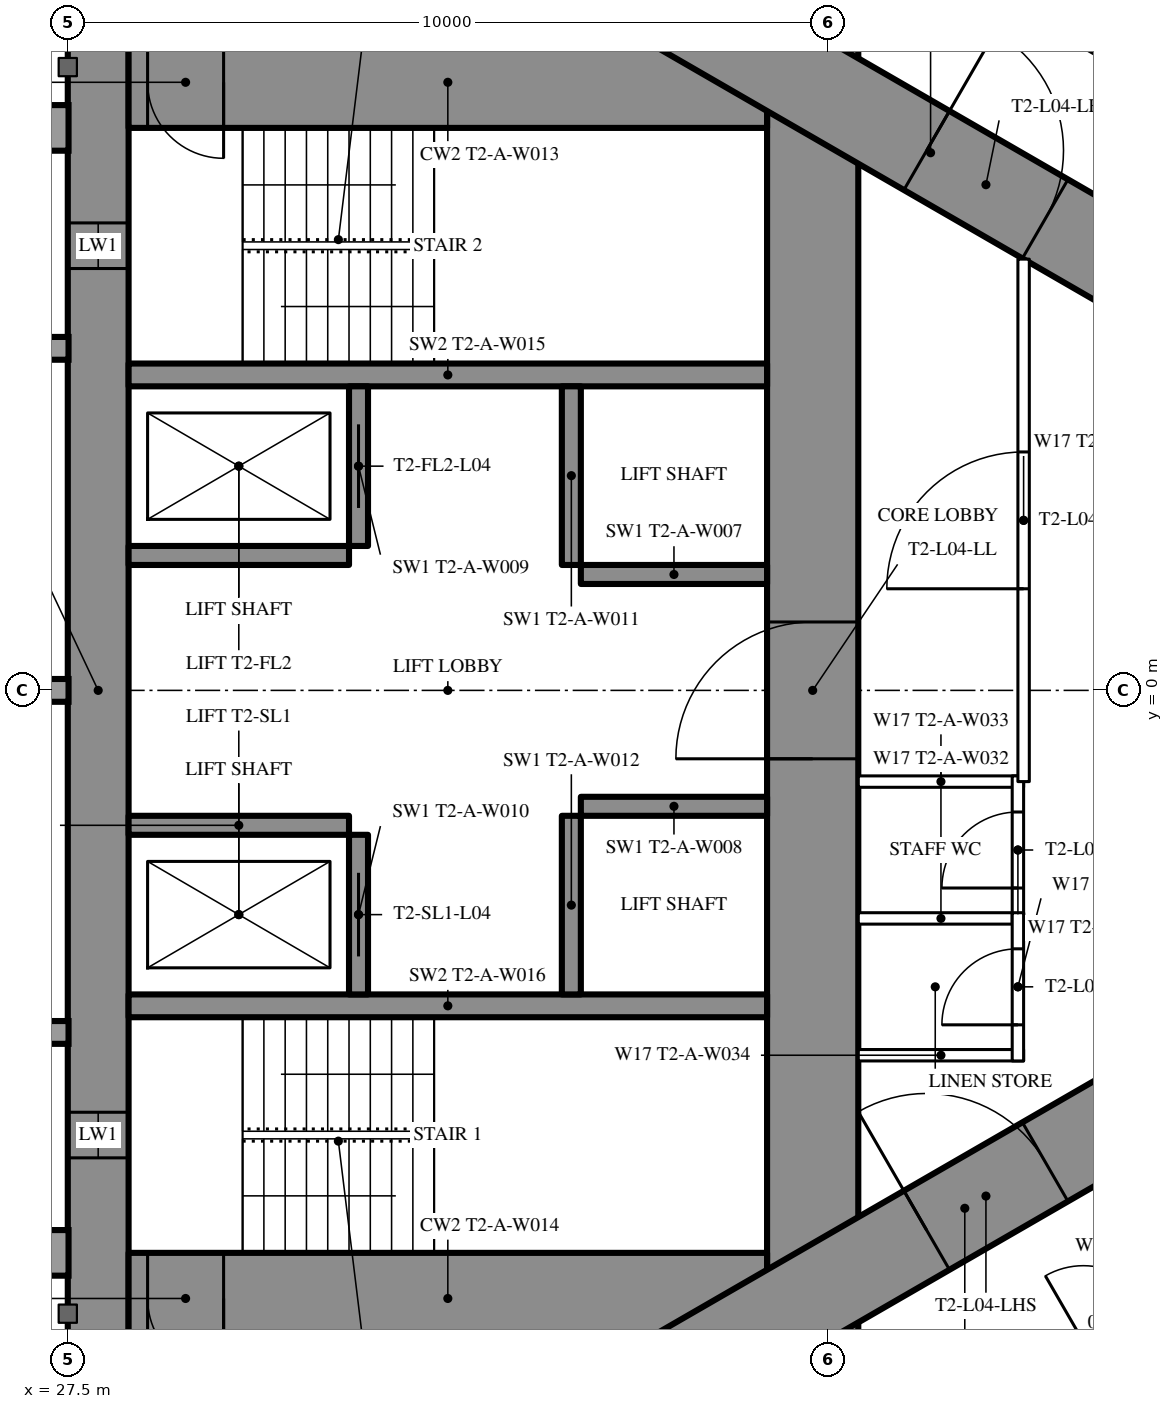
"""IFC4 building model, lengths in metres.
Left out: names, types, materials, properties, quantities, classifications, styles, units other than length and angle.
Written with IfcOpenShell. Run it as: python <this file> out.ifc"""

import sys

from ifc_helpers import new_model, si_unit, direction, frame, frame_2d, origin, place, context, subcontext, project, spatial, rectangle, extrude, element, fill, save


model = new_model("IFC4")
c1 = context("Model", 3, precision=1e-05, world=origin(), true_north=direction((0.0, 1.0)))
c2 = subcontext(c1, "Body", "Model", "MODEL_VIEW")
j1 = project(units=[si_unit("LENGTHUNIT", "METRE"), si_unit("PLANEANGLEUNIT", "RADIAN")], contexts=[c1])
p1 = place(None, origin())
s1 = spatial("IfcSite", under=j1, at=p1, CompositionType="ELEMENT")
p2 = place(p1, origin())
s2 = spatial("IfcBuilding", under=s1, at=p2, CompositionType="ELEMENT")
p3 = place(p2, frame((0.0, 0.0, 21.5)))
s3 = spatial("IfcBuildingStorey", under=s2, at=p3, CompositionType="ELEMENT", Elevation=21.5)
p4 = place(p3, frame((27.9, -8.6, 0.0), z_axis=(0.0, 0.0, 1.0), x_axis=(0.0, 1.0, 0.0)))
e1 = element("IfcWall", 1, at=p4, inside=s3, PredefinedType="SHEAR", context=c2, shape_type="SweptSolid", body=[
    extrude(rectangle(XDim=17.2, YDim=0.8, at=frame_2d((8.6, 0.0))), origin(), (0.0, 0.0, 1.0), 3.5),
])
p5 = place(p4, frame((2.45, 0.0, 0.6)))
e2 = element("IfcOpeningElement", 2, at=p5, cuts=e1, PredefinedType="OPENING", context=c2, shape_type="SweptSolid", body=[
    extrude(rectangle(XDim=0.6, YDim=2.1, at=frame_2d((0.3, 1.05))), frame((0.0, 0.41, 0.0), z_axis=(0.0, -1.0, 0.0), x_axis=(1.0, 0.0, 0.0)), (0.0, 0.0, 1.0), 0.82),
])
p6 = place(p4, frame((14.15, 0.0, 0.6)))
e3 = element("IfcOpeningElement", 3, at=p6, cuts=e1, PredefinedType="OPENING", context=c2, shape_type="SweptSolid", body=[
    extrude(rectangle(XDim=0.6, YDim=2.1, at=frame_2d((0.3, 1.05))), frame((0.0, 0.41, 0.0), z_axis=(0.0, -1.0, 0.0), x_axis=(1.0, 0.0, 0.0)), (0.0, 0.0, 1.0), 0.82),
])
p7 = place(p3, frame((37.3, -8.6, 0.0), z_axis=(0.0, 0.0, 1.0), x_axis=(0.0, 1.0, 0.0)))
e4 = element("IfcWall", 4, at=p7, inside=s3, PredefinedType="SHEAR", context=c2, shape_type="SweptSolid", body=[
    extrude(rectangle(XDim=17.2, YDim=1.2, at=frame_2d((8.6, 0.0))), origin(), (0.0, 0.0, 1.0), 3.5),
])
p8 = place(p7, frame((7.7, 0.0, 0.0)))
e5 = element("IfcOpeningElement", 5, at=p8, cuts=e4, PredefinedType="OPENING", context=c2, shape_type="SweptSolid", body=[
    extrude(rectangle(XDim=1.8, YDim=2.2, at=frame_2d((0.9, 1.1))), frame((0.0, 0.61, 0.0), z_axis=(0.0, -1.0, 0.0), x_axis=(1.0, 0.0, 0.0)), (0.0, 0.0, 1.0), 1.22),
])
p9 = place(p3, frame((28.3, -8.0, 0.0), z_axis=(0.0, 0.0, 1.0), x_axis=(1.0, 0.0, 0.0)))
e6 = element("IfcWall", 6, at=p9, inside=s3, PredefinedType="SHEAR", context=c2, shape_type="SweptSolid", body=[
    extrude(rectangle(XDim=8.4, YDim=1.2, at=frame_2d((4.2, 0.0))), origin(), (0.0, 0.0, 1.0), 3.5),
])
p10 = place(p9, frame((0.25, 0.0, 0.0)))
e7 = element("IfcOpeningElement", 7, at=p10, cuts=e6, PredefinedType="OPENING", context=c2, shape_type="SweptSolid", body=[
    extrude(rectangle(XDim=1.0, YDim=2.2, at=frame_2d((0.5, 1.1))), frame((0.0, 0.61, 0.0), z_axis=(0.0, -1.0, 0.0), x_axis=(1.0, 0.0, 0.0)), (0.0, 0.0, 1.0), 1.22),
])
p11 = place(p3, frame((28.3, 8.0, 0.0), z_axis=(0.0, 0.0, 1.0), x_axis=(1.0, 0.0, 0.0)))
e8 = element("IfcWall", 8, at=p11, inside=s3, PredefinedType="SHEAR", context=c2, shape_type="SweptSolid", body=[
    extrude(rectangle(XDim=8.4, YDim=1.2, at=frame_2d((4.2, 0.0))), origin(), (0.0, 0.0, 1.0), 3.5),
])
p12 = place(p11, frame((0.25, 0.0, 0.0)))
e9 = element("IfcOpeningElement", 9, at=p12, cuts=e8, PredefinedType="OPENING", context=c2, shape_type="SweptSolid", body=[
    extrude(rectangle(XDim=1.0, YDim=2.2, at=frame_2d((0.5, 1.1))), frame((0.0, 0.61, 0.0), z_axis=(0.0, -1.0, 0.0), x_axis=(1.0, 0.0, 0.0)), (0.0, 0.0, 1.0), 1.22),
])
for number, where, z_axis, x_axis in (
    (10, (28.3, -4.15, 0.0), (0.0, 0.0, 1.0), (1.0, 0.0, 0.0)),
    (11, (28.3, 4.15, 0.0), (0.0, 0.0, 1.0), (1.0, 0.0, 0.0)),
):
    element("IfcWall", number, at=place(p3, frame(where, z_axis=z_axis, x_axis=x_axis)), inside=s3, PredefinedType="SHEAR", context=c2, shape_type="SweptSolid", body=[
        extrude(rectangle(XDim=8.4, YDim=0.3, at=frame_2d((4.2, 0.0))), origin(), (0.0, 0.0, 1.0), 3.5),
    ])
p13 = place(p3, frame((31.325, -4.0, 0.0), z_axis=(0.0, 0.0, 1.0), x_axis=(0.0, 1.0, 0.0)))
e12 = element("IfcWall", 12, at=p13, inside=s3, PredefinedType="SHEAR", context=c2, shape_type="SweptSolid", body=[
    extrude(rectangle(XDim=2.1, YDim=0.25, at=frame_2d((1.05, 0.0))), origin(), (0.0, 0.0, 1.0), 3.5),
])
p14 = place(p13, frame((0.5, 0.0, 0.0)))
e13 = element("IfcOpeningElement", 13, at=p14, cuts=e12, PredefinedType="OPENING", context=c2, shape_type="SweptSolid", body=[
    extrude(rectangle(XDim=1.1, YDim=2.2, at=frame_2d((0.55, 1.1))), frame((0.0, 0.135, 0.0), z_axis=(0.0, -1.0, 0.0), x_axis=(1.0, 0.0, 0.0)), (0.0, 0.0, 1.0), 0.27),
])
p15 = place(p3, frame((34.125, -4.0, 0.0), z_axis=(0.0, 0.0, 1.0), x_axis=(0.0, 1.0, 0.0)))
e14 = element("IfcWall", 14, at=p15, inside=s3, PredefinedType="SHEAR", context=c2, shape_type="SweptSolid", body=[
    extrude(rectangle(XDim=2.35, YDim=0.25, at=frame_2d((1.175, 0.0))), origin(), (0.0, 0.0, 1.0), 3.5),
])
p16 = place(p3, frame((28.3, -1.775, 0.0), z_axis=(0.0, 0.0, 1.0), x_axis=(1.0, 0.0, 0.0)))
e15 = element("IfcWall", 15, at=p16, inside=s3, PredefinedType="SHEAR", context=c2, shape_type="SweptSolid", body=[
    extrude(rectangle(XDim=2.9, YDim=0.25, at=frame_2d((1.45, 0.0))), origin(), (0.0, 0.0, 1.0), 3.5),
])
p17 = place(p3, frame((34.25, -1.525, 0.0), z_axis=(0.0, 0.0, 1.0), x_axis=(1.0, 0.0, 0.0)))
e16 = element("IfcWall", 16, at=p17, inside=s3, PredefinedType="SHEAR", context=c2, shape_type="SweptSolid", body=[
    extrude(rectangle(XDim=2.45, YDim=0.25, at=frame_2d((1.225, 0.0))), origin(), (0.0, 0.0, 1.0), 3.5),
])
p18 = place(p3, frame((31.325, 1.9, 0.0), z_axis=(0.0, 0.0, 1.0), x_axis=(0.0, 1.0, 0.0)))
e17 = element("IfcWall", 17, at=p18, inside=s3, PredefinedType="SHEAR", context=c2, shape_type="SweptSolid", body=[
    extrude(rectangle(XDim=2.1, YDim=0.25, at=frame_2d((1.05, 0.0))), origin(), (0.0, 0.0, 1.0), 3.5),
])
p19 = place(p18, frame((0.5, 0.0, 0.0)))
e18 = element("IfcOpeningElement", 18, at=p19, cuts=e17, PredefinedType="OPENING", context=c2, shape_type="SweptSolid", body=[
    extrude(rectangle(XDim=1.1, YDim=2.2, at=frame_2d((0.55, 1.1))), frame((0.0, 0.135, 0.0), z_axis=(0.0, -1.0, 0.0), x_axis=(1.0, 0.0, 0.0)), (0.0, 0.0, 1.0), 0.27),
])
p20 = place(p3, frame((34.125, 1.65, 0.0), z_axis=(0.0, 0.0, 1.0), x_axis=(0.0, 1.0, 0.0)))
e19 = element("IfcWall", 19, at=p20, inside=s3, PredefinedType="SHEAR", context=c2, shape_type="SweptSolid", body=[
    extrude(rectangle(XDim=2.35, YDim=0.25, at=frame_2d((1.175, 0.0))), origin(), (0.0, 0.0, 1.0), 3.5),
])
p21 = place(p3, frame((28.3, 1.775, 0.0), z_axis=(0.0, 0.0, 1.0), x_axis=(1.0, 0.0, 0.0)))
e20 = element("IfcWall", 20, at=p21, inside=s3, PredefinedType="SHEAR", context=c2, shape_type="SweptSolid", body=[
    extrude(rectangle(XDim=2.9, YDim=0.25, at=frame_2d((1.45, 0.0))), origin(), (0.0, 0.0, 1.0), 3.5),
])
p22 = place(p3, frame((34.25, 1.525, 0.0), z_axis=(0.0, 0.0, 1.0), x_axis=(1.0, 0.0, 0.0)))
e21 = element("IfcWall", 21, at=p22, inside=s3, PredefinedType="SHEAR", context=c2, shape_type="SweptSolid", body=[
    extrude(rectangle(XDim=2.45, YDim=0.25, at=frame_2d((1.225, 0.0))), origin(), (0.0, 0.0, 1.0), 3.5),
])
p23 = place(p3, frame((27.2, -13.8, 0.0), z_axis=(0.0, 0.0, 1.0), x_axis=(0.866027159892, 0.499996958321, 0.0)))
e22 = element("IfcWall", 22, at=p23, inside=s3, PredefinedType="SHEAR", context=c2, shape_type="SweptSolid", body=[
    extrude(rectangle(XDim=27.947, YDim=1.2, at=frame_2d((13.973, 0.0))), origin(), (0.0, 0.0, 1.0), 3.5),
])
p24 = place(p23, frame((4.6, 0.0, 0.0)))
e23 = element("IfcOpeningElement", 23, at=p24, cuts=e22, PredefinedType="OPENING", context=c2, shape_type="SweptSolid", body=[
    extrude(rectangle(XDim=1.0, YDim=2.2, at=frame_2d((0.5, 1.1))), frame((0.0, 0.61, 0.0), z_axis=(0.0, -1.0, 0.0), x_axis=(1.0, 0.0, 0.0)), (0.0, 0.0, 1.0), 1.22),
])
p25 = place(p23, frame((13.395, 0.0, 0.0)))
e24 = element("IfcOpeningElement", 24, at=p25, cuts=e22, PredefinedType="OPENING", context=c2, shape_type="SweptSolid", body=[
    extrude(rectangle(XDim=1.8, YDim=2.2, at=frame_2d((0.9, 1.1))), frame((0.0, 0.61, 0.0), z_axis=(0.0, -1.0, 0.0), x_axis=(1.0, 0.0, 0.0)), (0.0, 0.0, 1.0), 1.22),
])
p26 = place(p3, frame((27.2, 13.8, 0.0), z_axis=(0.0, 0.0, 1.0), x_axis=(0.866024515034, -0.500001539357, 0.0)))
e25 = element("IfcWall", 25, at=p26, inside=s3, PredefinedType="SHEAR", context=c2, shape_type="SweptSolid", body=[
    extrude(rectangle(XDim=26.907, YDim=1.2, at=frame_2d((13.454, 0.0))), origin(), (0.0, 0.0, 1.0), 3.5),
])
p27 = place(p26, frame((4.6, 0.0, 0.0)))
e26 = element("IfcOpeningElement", 26, at=p27, cuts=e25, PredefinedType="OPENING", context=c2, shape_type="SweptSolid", body=[
    extrude(rectangle(XDim=1.0, YDim=2.2, at=frame_2d((0.5, 1.1))), frame((0.0, 0.61, 0.0), z_axis=(0.0, -1.0, 0.0), x_axis=(1.0, 0.0, 0.0)), (0.0, 0.0, 1.0), 1.22),
])
p28 = place(p26, frame((13.395, 0.0, 0.0)))
e27 = element("IfcOpeningElement", 27, at=p28, cuts=e25, PredefinedType="OPENING", context=c2, shape_type="SweptSolid", body=[
    extrude(rectangle(XDim=1.8, YDim=2.2, at=frame_2d((0.9, 1.1))), frame((0.0, 0.61, 0.0), z_axis=(0.0, -1.0, 0.0), x_axis=(1.0, 0.0, 0.0)), (0.0, 0.0, 1.0), 1.22),
])
p29 = place(p3, frame((36.834, 10.894, 0.0), z_axis=(0.0, 0.0, 1.0), x_axis=(0.866028157229, -0.499995230863, 0.0)))
e28 = element("IfcWall", 28, at=p29, inside=s3, PredefinedType="PARTITIONING", context=c2, shape_type="SweptSolid", body=[
    extrude(rectangle(XDim=21.667, YDim=0.2, at=frame_2d((10.833, 0.0))), origin(), (0.0, 0.0, 1.0), 3.25),
])
p30 = place(p29, frame((18.885, 0.0, 0.0)))
e29 = element("IfcOpeningElement", 29, at=p30, cuts=e28, PredefinedType="OPENING", context=c2, shape_type="SweptSolid", body=[
    extrude(rectangle(XDim=0.95, YDim=2.2, at=frame_2d((0.475, 1.1))), frame((0.0, 0.11, 0.0), z_axis=(0.0, -1.0, 0.0), x_axis=(1.0, 0.0, 0.0)), (0.0, 0.0, 1.0), 0.22),
])
p31 = place(p29, frame((14.835, 0.0, 0.0)))
e30 = element("IfcOpeningElement", 30, at=p31, cuts=e28, PredefinedType="OPENING", context=c2, shape_type="SweptSolid", body=[
    extrude(rectangle(XDim=0.95, YDim=2.2, at=frame_2d((0.475, 1.1))), frame((0.0, 0.11, 0.0), z_axis=(0.0, -1.0, 0.0), x_axis=(1.0, 0.0, 0.0)), (0.0, 0.0, 1.0), 0.22),
])
p32 = place(p29, frame((12.85, 0.0, 0.0)))
e31 = element("IfcOpeningElement", 31, at=p32, cuts=e28, PredefinedType="OPENING", context=c2, shape_type="SweptSolid", body=[
    extrude(rectangle(XDim=0.95, YDim=2.2, at=frame_2d((0.475, 1.1))), frame((0.0, 0.11, 0.0), z_axis=(0.0, -1.0, 0.0), x_axis=(1.0, 0.0, 0.0)), (0.0, 0.0, 1.0), 0.22),
])
p33 = place(p29, frame((1.542, 0.0, 0.0)))
e32 = element("IfcOpeningElement", 32, at=p33, cuts=e28, PredefinedType="OPENING", context=c2, shape_type="SweptSolid", body=[
    extrude(rectangle(XDim=0.95, YDim=2.2, at=frame_2d((0.475, 1.1))), frame((0.0, 0.11, 0.0), z_axis=(0.0, -1.0, 0.0), x_axis=(1.0, 0.0, 0.0)), (0.0, 0.0, 1.0), 0.22),
])
p34 = place(p3, frame((37.96, -10.243, 0.0), z_axis=(0.0, 0.0, 1.0), x_axis=(0.866024617314, 0.500001362204, 0.0)))
e33 = element("IfcWall", 33, at=p34, inside=s3, PredefinedType="PARTITIONING", context=c2, shape_type="SweptSolid", body=[
    extrude(rectangle(XDim=8.512, YDim=0.2, at=frame_2d((4.256, 0.0))), origin(), (0.0, 0.0, 1.0), 3.25),
])
p35 = place(p34, frame((3.35, 0.0, 0.0)))
e34 = element("IfcOpeningElement", 34, at=p35, cuts=e33, PredefinedType="OPENING", context=c2, shape_type="SweptSolid", body=[
    extrude(rectangle(XDim=1.0, YDim=2.2, at=frame_2d((0.5, 1.1))), frame((0.0, 0.11, 0.0), z_axis=(0.0, -1.0, 0.0), x_axis=(1.0, 0.0, 0.0)), (0.0, 0.0, 1.0), 0.22),
])
for number, where, z_axis, x_axis in (
    (35, (37.9, -1.2, 0.0), (0.0, 0.0, 1.0), (1.0, 0.0, 0.0)),
    (36, (37.9, -3.0, 0.0), (0.0, 0.0, 1.0), (1.0, 0.0, 0.0)),
    (37, (37.9, -4.8, 0.0), (0.0, 0.0, 1.0), (1.0, 0.0, 0.0)),
):
    element("IfcWall", number, at=place(p3, frame(where, z_axis=z_axis, x_axis=x_axis)), inside=s3, PredefinedType="PARTITIONING", context=c2, shape_type="SweptSolid", body=[
        extrude(rectangle(XDim=2.175, YDim=0.15, at=frame_2d((1.087, 0.0))), origin(), (0.0, 0.0, 1.0), 3.25),
    ])
p36 = place(p3, frame((40.0, -3.075, 0.0), z_axis=(0.0, 0.0, 1.0), x_axis=(0.0, 1.0, 0.0)))
e38 = element("IfcWall", 38, at=p36, inside=s3, PredefinedType="PARTITIONING", context=c2, shape_type="SweptSolid", body=[
    extrude(rectangle(XDim=1.95, YDim=0.15, at=frame_2d((0.975, 0.0))), origin(), (0.0, 0.0, 1.0), 3.25),
])
p37 = place(p36, frame((0.475, 0.0, 0.0)))
e39 = element("IfcOpeningElement", 39, at=p37, cuts=e38, PredefinedType="OPENING", context=c2, shape_type="SweptSolid", body=[
    extrude(rectangle(XDim=1.0, YDim=2.2, at=frame_2d((0.5, 1.1))), frame((0.0, 0.085, 0.0), z_axis=(0.0, -1.0, 0.0), x_axis=(1.0, 0.0, 0.0)), (0.0, 0.0, 1.0), 0.17),
])
p38 = place(p3, frame((40.0, -4.875, 0.0), z_axis=(0.0, 0.0, 1.0), x_axis=(0.0, 1.0, 0.0)))
e40 = element("IfcWall", 40, at=p38, inside=s3, PredefinedType="PARTITIONING", context=c2, shape_type="SweptSolid", body=[
    extrude(rectangle(XDim=1.95, YDim=0.15, at=frame_2d((0.975, 0.0))), origin(), (0.0, 0.0, 1.0), 3.25),
])
p39 = place(p38, frame((0.475, 0.0, 0.0)))
e41 = element("IfcOpeningElement", 41, at=p39, cuts=e40, PredefinedType="OPENING", context=c2, shape_type="SweptSolid", body=[
    extrude(rectangle(XDim=1.0, YDim=2.2, at=frame_2d((0.5, 1.1))), frame((0.0, 0.085, 0.0), z_axis=(0.0, -1.0, 0.0), x_axis=(1.0, 0.0, 0.0)), (0.0, 0.0, 1.0), 0.17),
])
p40 = place(p3, frame((40.075, -1.2, 0.0), z_axis=(0.0, 0.0, 1.0), x_axis=(0.0, 1.0, 0.0)))
e42 = element("IfcWall", 42, at=p40, inside=s3, PredefinedType="PARTITIONING", context=c2, shape_type="SweptSolid", body=[
    extrude(rectangle(XDim=6.874, YDim=0.15, at=frame_2d((3.437, 0.0))), origin(), (0.0, 0.0, 1.0), 3.25),
])
p41 = place(p40, frame((2.537, 0.0, 0.0)))
e43 = element("IfcOpeningElement", 43, at=p41, cuts=e42, PredefinedType="OPENING", context=c2, shape_type="SweptSolid", body=[
    extrude(rectangle(XDim=1.8, YDim=2.2, at=frame_2d((0.9, 1.1))), frame((0.0, 0.085, 0.0), z_axis=(0.0, -1.0, 0.0), x_axis=(1.0, 0.0, 0.0)), (0.0, 0.0, 1.0), 0.17),
])
p42 = place(p35, origin())
e44 = element("IfcDoor", 44, at=p42, inside=s3, OperationType="SINGLE_SWING_LEFT", PredefinedType="DOOR", context=c2, shape_type="SweptSolid", body=[
    extrude(rectangle(XDim=1.0, YDim=2.2, at=frame_2d((0.5, 1.1))), frame((0.0, 0.025, 0.0), z_axis=(0.0, -1.0, 0.0), x_axis=(1.0, 0.0, 0.0)), (0.0, 0.0, 1.0), 0.05),
])
fill(e34, e44)
p43 = place(p37, origin())
e45 = element("IfcDoor", 45, at=p43, inside=s3, OperationType="SINGLE_SWING_LEFT", PredefinedType="DOOR", context=c2, shape_type="SweptSolid", body=[
    extrude(rectangle(XDim=1.0, YDim=2.2, at=frame_2d((0.5, 1.1))), frame((0.0, 0.025, 0.0), z_axis=(0.0, -1.0, 0.0), x_axis=(1.0, 0.0, 0.0)), (0.0, 0.0, 1.0), 0.05),
])
fill(e39, e45)
p44 = place(p39, origin())
e46 = element("IfcDoor", 46, at=p44, inside=s3, OperationType="SINGLE_SWING_LEFT", PredefinedType="DOOR", context=c2, shape_type="SweptSolid", body=[
    extrude(rectangle(XDim=1.0, YDim=2.2, at=frame_2d((0.5, 1.1))), frame((0.0, 0.025, 0.0), z_axis=(0.0, -1.0, 0.0), x_axis=(1.0, 0.0, 0.0)), (0.0, 0.0, 1.0), 0.05),
])
fill(e41, e46)
p45 = place(p41, origin())
e47 = element("IfcDoor", 47, at=p45, inside=s3, OperationType="DOUBLE_DOOR_SINGLE_SWING", PredefinedType="DOOR", context=c2, shape_type="SweptSolid", body=[
    extrude(rectangle(XDim=1.8, YDim=2.2, at=frame_2d((0.9, 1.1))), frame((0.0, 0.025, 0.0), z_axis=(0.0, -1.0, 0.0), x_axis=(1.0, 0.0, 0.0)), (0.0, 0.0, 1.0), 0.05),
])
fill(e43, e47)
p46 = place(p25, origin())
e48 = element("IfcDoor", 48, at=p46, inside=s3, OperationType="DOUBLE_DOOR_SINGLE_SWING", PredefinedType="DOOR", context=c2, shape_type="SweptSolid", body=[
    extrude(rectangle(XDim=1.8, YDim=2.2, at=frame_2d((0.9, 1.1))), frame((0.0, 0.025, 0.0), z_axis=(0.0, -1.0, 0.0), x_axis=(1.0, 0.0, 0.0)), (0.0, 0.0, 1.0), 0.05),
])
fill(e24, e48)
p47 = place(p28, origin())
e49 = element("IfcDoor", 49, at=p47, inside=s3, OperationType="DOUBLE_DOOR_SINGLE_SWING", PredefinedType="DOOR", context=c2, shape_type="SweptSolid", body=[
    extrude(rectangle(XDim=1.8, YDim=2.2, at=frame_2d((0.9, 1.1))), frame((0.0, 0.025, 0.0), z_axis=(0.0, -1.0, 0.0), x_axis=(1.0, 0.0, 0.0)), (0.0, 0.0, 1.0), 0.05),
])
fill(e27, e49)
p48 = place(p8, origin())
e50 = element("IfcDoor", 50, at=p48, inside=s3, OperationType="DOUBLE_DOOR_SINGLE_SWING", PredefinedType="DOOR", context=c2, shape_type="SweptSolid", body=[
    extrude(rectangle(XDim=1.8, YDim=2.2, at=frame_2d((0.9, 1.1))), frame((0.0, 0.025, 0.0), z_axis=(0.0, -1.0, 0.0), x_axis=(1.0, 0.0, 0.0)), (0.0, 0.0, 1.0), 0.05),
])
fill(e5, e50)
p49 = place(p10, origin())
e51 = element("IfcDoor", 51, at=p49, inside=s3, OperationType="SINGLE_SWING_RIGHT", PredefinedType="DOOR", context=c2, shape_type="SweptSolid", body=[
    extrude(rectangle(XDim=1.0, YDim=2.2, at=frame_2d((0.5, 1.1))), frame((0.0, 0.025, 0.0), z_axis=(0.0, -1.0, 0.0), x_axis=(1.0, 0.0, 0.0)), (0.0, 0.0, 1.0), 0.05),
])
fill(e7, e51)
p50 = place(p12, origin())
e52 = element("IfcDoor", 52, at=p50, inside=s3, OperationType="SINGLE_SWING_RIGHT", PredefinedType="DOOR", context=c2, shape_type="SweptSolid", body=[
    extrude(rectangle(XDim=1.0, YDim=2.2, at=frame_2d((0.5, 1.1))), frame((0.0, 0.025, 0.0), z_axis=(0.0, -1.0, 0.0), x_axis=(1.0, 0.0, 0.0)), (0.0, 0.0, 1.0), 0.05),
])
fill(e9, e52)
p51 = place(p14, origin())
e53 = element("IfcDoor", 53, at=p51, inside=s3, OperationType="SLIDING_TO_LEFT", PredefinedType="USERDEFINED", context=c2, shape_type="SweptSolid", body=[
    extrude(rectangle(XDim=1.1, YDim=2.2, at=frame_2d((0.55, 1.1))), frame((0.0, 0.025, 0.0), z_axis=(0.0, -1.0, 0.0), x_axis=(1.0, 0.0, 0.0)), (0.0, 0.0, 1.0), 0.05),
])
fill(e13, e53)
p52 = place(p19, origin())
e54 = element("IfcDoor", 54, at=p52, inside=s3, OperationType="SLIDING_TO_LEFT", PredefinedType="USERDEFINED", context=c2, shape_type="SweptSolid", body=[
    extrude(rectangle(XDim=1.1, YDim=2.2, at=frame_2d((0.55, 1.1))), frame((0.0, 0.025, 0.0), z_axis=(0.0, -1.0, 0.0), x_axis=(1.0, 0.0, 0.0)), (0.0, 0.0, 1.0), 0.05),
])
fill(e18, e54)
p53 = place(p5, origin())
e55 = element("IfcWindow", 55, at=p53, inside=s3, PartitioningType="SINGLE_PANEL", PredefinedType="WINDOW", context=c2, shape_type="SweptSolid", body=[
    extrude(rectangle(XDim=0.6, YDim=2.1, at=frame_2d((0.3, 1.05))), frame((0.0, 0.03, 0.0), z_axis=(0.0, -1.0, 0.0), x_axis=(1.0, 0.0, 0.0)), (0.0, 0.0, 1.0), 0.06),
])
fill(e2, e55)
p54 = place(p6, origin())
e56 = element("IfcWindow", 56, at=p54, inside=s3, PartitioningType="SINGLE_PANEL", PredefinedType="WINDOW", context=c2, shape_type="SweptSolid", body=[
    extrude(rectangle(XDim=0.6, YDim=2.1, at=frame_2d((0.3, 1.05))), frame((0.0, 0.03, 0.0), z_axis=(0.0, -1.0, 0.0), x_axis=(1.0, 0.0, 0.0)), (0.0, 0.0, 1.0), 0.06),
])
fill(e3, e56)
save(model, sys.argv[1])
